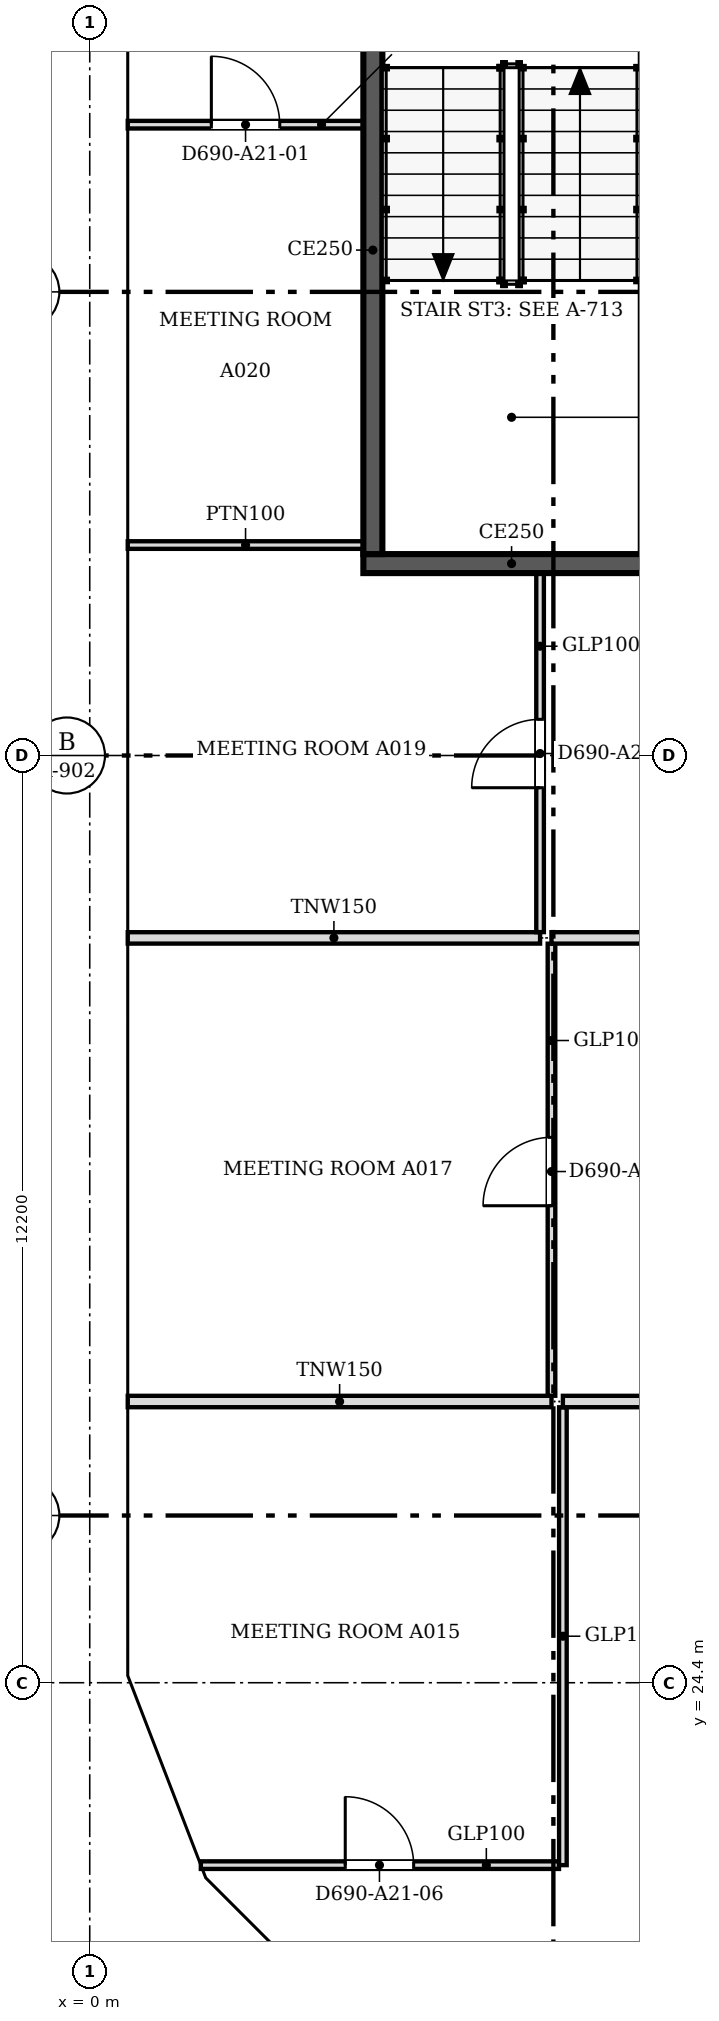
"""IFC4 building model, lengths in metres.
Left out: names, types, materials, properties, quantities, classifications, styles, units other than length and angle.
Written with IfcOpenShell. Run it as: python <this file> out.ifc"""

import sys

from ifc_helpers import new_model, si_unit, direction, frame, frame_2d, origin, place, context, subcontext, project, spatial, polyline, rectangle, outline, extrude, faceted_brep, source, transform, mapped, element, fill, save


model = new_model("IFC4")
c1 = context("Model", 3, precision=1e-05, world=origin(), true_north=direction((0.0, 1.0)))
c2 = subcontext(c1, "Body", "Model", "MODEL_VIEW")
j1 = project(units=[si_unit("LENGTHUNIT", "METRE"), si_unit("PLANEANGLEUNIT", "RADIAN")], contexts=[c1])
p1 = place(None, origin())
s1 = spatial("IfcSite", under=j1, at=p1, CompositionType="ELEMENT")
p2 = place(p1, origin())
s2 = spatial("IfcBuilding", under=s1, at=p2, CompositionType="ELEMENT")
p3 = place(p2, frame((0.0, 0.0, 240.7)))
s3 = spatial("IfcBuildingStorey", under=s2, at=p3, CompositionType="ELEMENT", Elevation=240.7)
m1 = source(origin(), c2, "Body", "Brep", [
    faceted_brep([(0.047, -0.25, 0.0), (3.05, -0.25, 3.8), (0.047, -0.25, 7.6), (0.0, -0.25, 7.54), (0.0, -0.25, 0.06), (0.093, 0.25, 7.541), (3.05, 0.25, 3.8), (0.093, 0.25, 0.059), (0.047, 0.0, 0.0), (0.047, 0.0, 7.6)], [[[0, 1, 2, 3, 4]], [[5, 6, 7]], [[7, 6, 1, 0, 8]], [[6, 5, 9, 2, 1]], [[3, 2, 9]], [[8, 0, 4]], [[7, 8, 4, 3, 9, 5]]]),
])
p4 = place(p3, frame((0.25, 48.8, -3.8), z_axis=(0.0, 0.0, 1.0), x_axis=(0.0, -1.0, 0.0)))
e1 = element("IfcWall", 1, at=p4, inside=s3, PredefinedType="SOLIDWALL", context=c2, shape_type="MappedRepresentation", body=[
    mapped(m1, transform((0.0, 0.0, 0.0), scale=1.0)),
])
m2 = source(origin(), c2, "Body", "SweptSolid", [
    extrude(outline(polyline([(0.247, 0.656), (2.731, 3.8), (0.247, 6.944), (0.247, 0.656)])), frame((0.0, 0.26, 0.0), z_axis=(0.0, -1.0, 0.0), x_axis=(1.0, 0.0, 0.0)), (0.0, 0.0, 1.0), 0.52),
])
p5 = place(p4, origin())
e2 = element("IfcOpeningElement", 2, at=p5, cuts=e1, PredefinedType="OPENING", context=c2, shape_type="MappedRepresentation", body=[
    mapped(m2, transform((0.0, 0.0, 0.0), scale=1.0)),
])
m3 = source(origin(), c2, "Body", "SweptSolid", [
    extrude(outline(polyline([(3.05, 0.0), (6.1, 3.8), (3.05, 7.6), (0.0, 3.8), (3.05, 0.0)])), frame((0.0, 0.25, 0.0), z_axis=(0.0, -1.0, 0.0), x_axis=(1.0, 0.0, 0.0)), (0.0, 0.0, 1.0), 0.5),
])
p6 = place(p3, frame((0.25, 45.75, -3.8), z_axis=(0.0, 0.0, 1.0), x_axis=(0.0, -1.0, 0.0)))
e3 = element("IfcWall", 3, at=p6, inside=s3, PredefinedType="SOLIDWALL", context=c2, shape_type="MappedRepresentation", body=[
    mapped(m3, transform((0.0, 0.0, 0.0), scale=1.0)),
])
m4 = source(origin(), c2, "Body", "SweptSolid", [
    extrude(outline(polyline([(3.05, 0.399), (5.78, 3.8), (3.05, 7.201), (0.321, 3.8), (3.05, 0.399)])), frame((0.0, 0.26, 0.0), z_axis=(0.0, -1.0, 0.0), x_axis=(1.0, 0.0, 0.0)), (0.0, 0.0, 1.0), 0.52),
])
p7 = place(p6, origin())
e4 = element("IfcOpeningElement", 4, at=p7, cuts=e3, PredefinedType="OPENING", context=c2, shape_type="MappedRepresentation", body=[
    mapped(m4, transform((0.0, 0.0, 0.0), scale=1.0)),
])
m5 = source(origin(), c2, "Body", "Brep", [
    faceted_brep([(3.05, -0.25, 0.0), (6.1, -0.25, 3.8), (6.1, -0.25, 3.8), (3.05, -0.25, 7.6), (0.0, -0.25, 3.8), (0.0, 0.25, 3.8), (3.05, 0.25, 7.6), (6.1, 0.25, 3.8), (6.1, 0.25, 3.8), (3.05, 0.25, 0.0)], [[[0, 1, 2, 3, 4]], [[5, 6, 7, 8, 9]], [[9, 8, 1, 0]], [[7, 6, 3, 2]], [[6, 5, 4, 3]], [[5, 9, 0, 4]], [[1, 8, 7, 2]]]),
])
p8 = place(p3, frame((0.25, 39.65, -3.8), z_axis=(0.0, 0.0, 1.0), x_axis=(0.0, -1.0, 0.0)))
e5 = element("IfcWall", 5, at=p8, inside=s3, PredefinedType="SOLIDWALL", context=c2, shape_type="MappedRepresentation", body=[
    mapped(m5, transform((0.0, 0.0, 0.0), scale=1.0)),
])
p9 = place(p8, origin())
e6 = element("IfcOpeningElement", 6, at=p9, cuts=e5, PredefinedType="OPENING", context=c2, shape_type="MappedRepresentation", body=[
    mapped(m4, transform((0.0, 0.0, 0.0), scale=1.0)),
])
p10 = place(p3, frame((0.25, 33.55, -3.8), z_axis=(0.0, 0.0, 1.0), x_axis=(0.0, -1.0, 0.0)))
e7 = element("IfcWall", 7, at=p10, inside=s3, PredefinedType="SOLIDWALL", context=c2, shape_type="MappedRepresentation", body=[
    mapped(m3, transform((0.0, 0.0, 0.0), scale=1.0)),
])
p11 = place(p10, origin())
e8 = element("IfcOpeningElement", 8, at=p11, cuts=e7, PredefinedType="OPENING", context=c2, shape_type="MappedRepresentation", body=[
    mapped(m4, transform((0.0, 0.0, 0.0), scale=1.0)),
])
m6 = source(origin(), c2, "Body", "Brep", [
    faceted_brep([(3.003, -0.25, 0.0), (3.05, -0.25, 0.06), (3.05, -0.25, 7.54), (3.003, -0.25, 7.6), (0.0, -0.25, 3.8), (0.0, 0.25, 3.8), (2.957, 0.25, 7.541), (2.957, 0.25, 0.059), (3.003, 0.0, 0.0), (3.003, 0.0, 7.6)], [[[0, 1, 2, 3, 4]], [[5, 6, 7]], [[1, 0, 8]], [[9, 3, 2]], [[6, 5, 4, 3, 9]], [[5, 7, 8, 0, 4]], [[1, 8, 7, 6, 9, 2]]]),
])
p12 = place(p3, frame((0.25, 27.45, -3.8), z_axis=(0.0, 0.0, 1.0), x_axis=(0.0, -1.0, 0.0)))
e9 = element("IfcWall", 9, at=p12, inside=s3, PredefinedType="SOLIDWALL", context=c2, shape_type="MappedRepresentation", body=[
    mapped(m6, transform((0.0, 0.0, 0.0), scale=1.0)),
])
m7 = source(origin(), c2, "Body", "SweptSolid", [
    extrude(outline(polyline([(2.803, 6.944), (0.319, 3.8), (2.803, 0.656), (2.803, 6.944)])), frame((0.0, 0.26, 0.0), z_axis=(0.0, -1.0, 0.0), x_axis=(1.0, 0.0, 0.0)), (0.0, 0.0, 1.0), 0.52),
])
p13 = place(p12, origin())
e10 = element("IfcOpeningElement", 10, at=p13, cuts=e9, PredefinedType="OPENING", context=c2, shape_type="MappedRepresentation", body=[
    mapped(m7, transform((0.0, 0.0, 0.0), scale=1.0)),
])
m8 = source(origin(), c2, "Body", "Brep", [
    faceted_brep([(0.047, -0.25, 0.0), (2.997, -0.25, 3.8), (0.047, -0.25, 7.6), (0.0, -0.25, 7.541), (0.0, -0.25, 0.059), (0.093, 0.25, 7.54), (2.944, 0.25, 3.868), (2.944, 0.25, 3.732), (0.093, 0.25, 0.06), (2.997, 0.0, 3.8), (0.047, 0.0, 0.0), (0.047, 0.0, 7.6)], [[[0, 1, 2, 3, 4]], [[5, 6, 7, 8]], [[8, 7, 9, 1, 0, 10]], [[6, 5, 11, 2, 1, 9]], [[3, 2, 11]], [[10, 0, 4]], [[8, 10, 4, 3, 11, 5]], [[9, 7, 6]]]),
])
p14 = place(p3, frame((0.233, 24.49, -3.8), z_axis=(0.0, 0.0, 1.0), x_axis=(0.359901446078, -0.932990326376, 0.0)))
e11 = element("IfcWall", 11, at=p14, inside=s3, PredefinedType="SOLIDWALL", context=c2, shape_type="MappedRepresentation", body=[
    mapped(m8, transform((0.0, 0.0, 0.0), scale=1.0)),
])
m9 = source(origin(), c2, "Body", "SweptSolid", [
    extrude(outline(polyline([(0.247, 0.665), (2.681, 3.8), (0.247, 6.935), (0.247, 0.665)])), frame((0.0, 0.26, 0.0), z_axis=(0.0, -1.0, 0.0), x_axis=(1.0, 0.0, 0.0)), (0.0, 0.0, 1.0), 0.52),
])
p15 = place(p14, origin())
e12 = element("IfcOpeningElement", 12, at=p15, cuts=e11, PredefinedType="OPENING", context=c2, shape_type="MappedRepresentation", body=[
    mapped(m9, transform((0.0, 0.0, 0.0), scale=1.0)),
])
m10 = source(origin(), c2, "Body", "Brep", [
    faceted_brep([(2.944, -0.25, 0.0), (2.997, -0.25, 0.068), (2.997, -0.25, 7.532), (2.944, -0.25, 7.6), (0.0, -0.25, 3.8), (0.053, 0.25, 3.868), (2.891, 0.25, 7.532), (2.891, 0.25, 0.068), (0.053, 0.25, 3.732), (2.944, 0.0, 0.0), (2.944, 0.0, 7.6), (0.0, 0.0, 3.8)], [[[0, 1, 2, 3, 4]], [[5, 6, 7, 8]], [[1, 0, 9]], [[10, 3, 2]], [[6, 5, 11, 4, 3, 10]], [[8, 7, 9, 0, 4, 11]], [[8, 11, 5]], [[1, 9, 7, 6, 10, 2]]]),
])
p16 = place(p3, frame((1.312, 21.694, -3.8), z_axis=(0.0, 0.0, 1.0), x_axis=(0.707066050402, -0.707147509625, 0.0)))
e13 = element("IfcWall", 13, at=p16, inside=s3, PredefinedType="SOLIDWALL", context=c2, shape_type="MappedRepresentation", body=[
    mapped(m10, transform((0.0, 0.0, 0.0), scale=1.0)),
])
m11 = source(origin(), c2, "Body", "SweptSolid", [
    extrude(outline(polyline([(2.744, 6.934), (0.316, 3.8), (2.744, 0.667), (2.744, 6.934)])), frame((0.0, 0.26, 0.0), z_axis=(0.0, -1.0, 0.0), x_axis=(1.0, 0.0, 0.0)), (0.0, 0.0, 1.0), 0.52),
])
p17 = place(p16, origin())
e14 = element("IfcOpeningElement", 14, at=p17, cuts=e13, PredefinedType="OPENING", context=c2, shape_type="MappedRepresentation", body=[
    mapped(m11, transform((0.0, 0.0, 0.0), scale=1.0)),
])
p18 = place(p2, frame((0.0, 0.0, 244.5)))
s4 = spatial("IfcBuildingStorey", under=s2, at=p18, CompositionType="ELEMENT", Elevation=244.5)
m12 = source(origin(), c2, "Body", "Brep", [
    faceted_brep([(3.003, -0.25, 0.0), (6.053, -0.25, 3.8), (3.003, -0.25, 7.6), (0.0, -0.25, 3.8), (0.047, 0.25, 3.859), (3.003, 0.25, 7.6), (6.053, 0.25, 3.8), (3.003, 0.25, 0.0), (0.047, 0.25, 3.741), (0.0, 0.0, 3.8)], [[[0, 1, 2, 3]], [[4, 5, 6, 7, 8]], [[7, 6, 1, 0]], [[6, 5, 2, 1]], [[5, 4, 9, 3, 2]], [[8, 7, 0, 3, 9]], [[8, 9, 4]]]),
])
p19 = place(p18, frame((0.25, 48.753, -3.8), z_axis=(0.0, 0.0, 1.0), x_axis=(0.0, -1.0, 0.0)))
e15 = element("IfcWall", 15, at=p19, inside=s4, PredefinedType="SOLIDWALL", context=c2, shape_type="MappedRepresentation", body=[
    mapped(m12, transform((0.0, 0.0, 0.0), scale=1.0)),
])
m13 = source(origin(), c2, "Body", "SweptSolid", [
    extrude(outline(polyline([(3.005, 0.401), (5.733, 3.8), (3.005, 7.199), (0.319, 3.8), (3.005, 0.401)])), frame((0.0, 0.26, 0.0), z_axis=(0.0, -1.0, 0.0), x_axis=(1.0, 0.0, 0.0)), (0.0, 0.0, 1.0), 0.52),
])
p20 = place(p19, origin())
e16 = element("IfcOpeningElement", 16, at=p20, cuts=e15, PredefinedType="OPENING", context=c2, shape_type="MappedRepresentation", body=[
    mapped(m13, transform((0.0, 0.0, 0.0), scale=1.0)),
])
p21 = place(p18, frame((0.25, 42.7, -3.8), z_axis=(0.0, 0.0, 1.0), x_axis=(0.0, -1.0, 0.0)))
e17 = element("IfcWall", 17, at=p21, inside=s4, PredefinedType="SOLIDWALL", context=c2, shape_type="MappedRepresentation", body=[
    mapped(m5, transform((0.0, 0.0, 0.0), scale=1.0)),
])
p22 = place(p21, origin())
e18 = element("IfcOpeningElement", 18, at=p22, cuts=e17, PredefinedType="OPENING", context=c2, shape_type="MappedRepresentation", body=[
    mapped(m4, transform((0.0, 0.0, 0.0), scale=1.0)),
])
p23 = place(p18, frame((0.25, 36.6, -3.8), z_axis=(0.0, 0.0, 1.0), x_axis=(0.0, -1.0, 0.0)))
e19 = element("IfcWall", 19, at=p23, inside=s4, PredefinedType="SOLIDWALL", context=c2, shape_type="MappedRepresentation", body=[
    mapped(m3, transform((0.0, 0.0, 0.0), scale=1.0)),
])
p24 = place(p23, origin())
e20 = element("IfcOpeningElement", 20, at=p24, cuts=e19, PredefinedType="OPENING", context=c2, shape_type="MappedRepresentation", body=[
    mapped(m4, transform((0.0, 0.0, 0.0), scale=1.0)),
])
m14 = source(origin(), c2, "Body", "Brep", [
    faceted_brep([(3.05, -0.25, 0.0), (6.053, -0.25, 3.8), (3.05, -0.25, 7.6), (0.0, -0.25, 3.8), (0.0, 0.25, 3.8), (3.05, 0.25, 7.6), (6.007, 0.25, 3.859), (6.007, 0.25, 3.741), (3.05, 0.25, 0.0), (6.053, 0.0, 3.8)], [[[0, 1, 2, 3]], [[4, 5, 6, 7, 8]], [[8, 7, 9, 1, 0]], [[6, 5, 2, 1, 9]], [[5, 4, 3, 2]], [[4, 8, 0, 3]], [[9, 7, 6]]]),
])
p25 = place(p18, frame((0.25, 30.5, -3.8), z_axis=(0.0, 0.0, 1.0), x_axis=(0.0, -1.0, 0.0)))
e21 = element("IfcWall", 21, at=p25, inside=s4, PredefinedType="SOLIDWALL", context=c2, shape_type="MappedRepresentation", body=[
    mapped(m14, transform((0.0, 0.0, 0.0), scale=1.0)),
])
m15 = source(origin(), c2, "Body", "SweptSolid", [
    extrude(outline(polyline([(3.049, 0.401), (5.735, 3.8), (3.049, 7.199), (0.321, 3.8), (3.049, 0.401)])), frame((0.0, 0.26, 0.0), z_axis=(0.0, -1.0, 0.0), x_axis=(1.0, 0.0, 0.0)), (0.0, 0.0, 1.0), 0.52),
])
p26 = place(p25, origin())
e22 = element("IfcOpeningElement", 22, at=p26, cuts=e21, PredefinedType="OPENING", context=c2, shape_type="MappedRepresentation", body=[
    mapped(m15, transform((0.0, 0.0, 0.0), scale=1.0)),
])
m16 = source(origin(), c2, "Body", "Brep", [
    faceted_brep([(2.95, -0.25, 0.0), (3.003, -0.25, 0.068), (3.003, -0.25, 7.532), (2.95, -0.25, 7.6), (0.0, -0.25, 3.8), (0.047, 0.25, 3.86), (2.898, 0.25, 7.532), (2.898, 0.25, 0.068), (0.047, 0.25, 3.74), (2.95, 0.0, 0.0), (2.95, 0.0, 7.6), (0.0, 0.0, 3.8)], [[[0, 1, 2, 3, 4]], [[5, 6, 7, 8]], [[1, 0, 9]], [[10, 3, 2]], [[6, 5, 11, 4, 3, 10]], [[8, 7, 9, 0, 4, 11]], [[8, 11, 5]], [[1, 9, 7, 6, 10, 2]]]),
])
p27 = place(p18, frame((0.25, 24.447, -3.8), z_axis=(0.0, 0.0, 1.0), x_axis=(0.35992665181, -0.932980602862, 0.0)))
e23 = element("IfcWall", 23, at=p27, inside=s4, PredefinedType="SOLIDWALL", context=c2, shape_type="MappedRepresentation", body=[
    mapped(m16, transform((0.0, 0.0, 0.0), scale=1.0)),
])
m17 = source(origin(), c2, "Body", "SweptSolid", [
    extrude(outline(polyline([(2.75, 6.935), (0.316, 3.8), (2.75, 0.665), (2.75, 6.935)])), frame((0.0, 0.26, 0.0), z_axis=(0.0, -1.0, 0.0), x_axis=(1.0, 0.0, 0.0)), (0.0, 0.0, 1.0), 0.52),
])
p28 = place(p27, origin())
e24 = element("IfcOpeningElement", 24, at=p28, cuts=e23, PredefinedType="OPENING", context=c2, shape_type="MappedRepresentation", body=[
    mapped(m17, transform((0.0, 0.0, 0.0), scale=1.0)),
])
m18 = source(origin(), c2, "Body", "Brep", [
    faceted_brep([(0.053, -0.25, 0.0), (2.997, -0.25, 3.8), (0.053, -0.25, 7.6), (0.0, -0.25, 7.532), (0.0, -0.25, 0.068), (0.106, 0.25, 7.532), (2.944, 0.25, 3.868), (2.944, 0.25, 3.732), (0.106, 0.25, 0.068), (2.997, 0.0, 3.8), (0.053, 0.0, 0.0), (0.053, 0.0, 7.6)], [[[0, 1, 2, 3, 4]], [[5, 6, 7, 8]], [[8, 7, 9, 1, 0, 10]], [[6, 5, 11, 2, 1, 9]], [[3, 2, 11]], [[10, 0, 4]], [[8, 10, 4, 3, 11, 5]], [[9, 7, 6]]]),
])
p29 = place(p18, frame((1.274, 21.731, -3.8), z_axis=(0.0, 0.0, 1.0), x_axis=(0.707147509625, -0.707066050402, 0.0)))
e25 = element("IfcWall", 25, at=p29, inside=s4, PredefinedType="SOLIDWALL", context=c2, shape_type="MappedRepresentation", body=[
    mapped(m18, transform((0.0, 0.0, 0.0), scale=1.0)),
])
m19 = source(origin(), c2, "Body", "SweptSolid", [
    extrude(outline(polyline([(0.253, 0.666), (2.681, 3.8), (0.253, 6.934), (0.253, 0.666)])), frame((0.0, 0.26, 0.0), z_axis=(0.0, -1.0, 0.0), x_axis=(1.0, 0.0, 0.0)), (0.0, 0.0, 1.0), 0.52),
])
p30 = place(p29, origin())
e26 = element("IfcOpeningElement", 26, at=p30, cuts=e25, PredefinedType="OPENING", context=c2, shape_type="MappedRepresentation", body=[
    mapped(m19, transform((0.0, 0.0, 0.0), scale=1.0)),
])
p31 = place(p3, frame((7.5, 39.125, 0.0), z_axis=(0.0, 0.0, 1.0), x_axis=(-1.0, 0.0, 0.0)))
e27 = element("IfcWall", 27, at=p31, inside=s3, PredefinedType="SOLIDWALL", context=c2, shape_type="SweptSolid", body=[
    extrude(rectangle(XDim=3.9, YDim=0.25, at=frame_2d((1.95, 0.0))), origin(), (0.0, 0.0, 1.0), 3.8),
])
p32 = place(p3, frame((3.725, 39.25, 0.0), z_axis=(0.0, 0.0, 1.0), x_axis=(0.0, 1.0, 0.0)))
e28 = element("IfcWall", 28, at=p32, inside=s3, PredefinedType="SOLIDWALL", context=c2, shape_type="SweptSolid", body=[
    extrude(rectangle(XDim=8.0, YDim=0.25, at=frame_2d((4.0, 0.0))), origin(), (0.0, 0.0, 1.0), 3.8),
])
p33 = place(p3, frame((1.462, 22.0, 0.0), z_axis=(0.0, 0.0, 1.0), x_axis=(1.0, 0.0, 0.0)))
e29 = element("IfcWall", 29, at=p33, inside=s3, PredefinedType="PARTITIONING", context=c2, shape_type="SweptSolid", body=[
    extrude(rectangle(XDim=4.712, YDim=0.1, at=frame_2d((2.356, 0.0))), origin(), (0.0, 0.0, 1.0), 3.067),
])
m20 = source(origin(), c2, "Body", "SweptSolid", [
    extrude(rectangle(XDim=0.9, YDim=2.1, at=frame_2d((0.45, 1.05))), frame((0.0, 0.06, 0.0), z_axis=(0.0, -1.0, 0.0), x_axis=(1.0, 0.0, 0.0)), (0.0, 0.0, 1.0), 0.12),
])
p34 = place(p33, frame((1.9, 0.0, 0.0)))
e30 = element("IfcOpeningElement", 30, at=p34, cuts=e29, PredefinedType="OPENING", context=c2, shape_type="MappedRepresentation", body=[
    mapped(m20, transform((0.0, 0.0, 0.0), scale=1.0)),
])
p35 = place(p3, frame((6.225, 22.0, 0.0), z_axis=(0.0, 0.0, 1.0), x_axis=(0.0, 1.0, 0.0)))
e31 = element("IfcWall", 31, at=p35, inside=s3, PredefinedType="PARTITIONING", context=c2, shape_type="SweptSolid", body=[
    extrude(rectangle(XDim=6.024, YDim=0.1, at=frame_2d((3.012, 0.0))), origin(), (0.0, 0.0, 1.0), 3.067),
])
p36 = place(p3, frame((0.5, 28.1, 0.0), z_axis=(0.0, 0.0, 1.0), x_axis=(1.0, 0.0, 0.0)))
e32 = element("IfcWall", 32, at=p36, inside=s3, PredefinedType="PARTITIONING", context=c2, shape_type="SweptSolid", body=[
    extrude(rectangle(XDim=5.575, YDim=0.15, at=frame_2d((2.788, 0.0))), origin(), (0.0, 0.0, 1.0), 3.067),
])
p37 = place(p3, frame((6.225, 28.1, 0.0), z_axis=(0.0, 0.0, 1.0), x_axis=(1.0, 0.0, 0.0)))
e33 = element("IfcWall", 33, at=p37, inside=s3, PredefinedType="PARTITIONING", context=c2, shape_type="SweptSolid", body=[
    extrude(rectangle(XDim=21.799, YDim=0.15, at=frame_2d((10.899, 0.0))), origin(), (0.0, 0.0, 1.0), 3.067),
])
p38 = place(p3, frame((6.075, 28.176, 0.0), z_axis=(0.0, 0.0, 1.0), x_axis=(0.0, 1.0, 0.0)))
e34 = element("IfcWall", 34, at=p38, inside=s3, PredefinedType="PARTITIONING", context=c2, shape_type="SweptSolid", body=[
    extrude(rectangle(XDim=5.948, YDim=0.1, at=frame_2d((2.974, 0.0))), origin(), (0.0, 0.0, 1.0), 3.067),
])
p39 = place(p38, frame((2.5, 0.0, 0.0)))
e35 = element("IfcOpeningElement", 35, at=p39, cuts=e34, PredefinedType="OPENING", context=c2, shape_type="MappedRepresentation", body=[
    mapped(m20, transform((0.0, 0.0, 0.0), scale=1.0)),
])
p40 = place(p3, frame((0.5, 34.2, 0.0), z_axis=(0.0, 0.0, 1.0), x_axis=(1.0, 0.0, 0.0)))
e36 = element("IfcWall", 36, at=p40, inside=s3, PredefinedType="PARTITIONING", context=c2, shape_type="SweptSolid", body=[
    extrude(rectangle(XDim=5.425, YDim=0.15, at=frame_2d((2.712, 0.0))), origin(), (0.0, 0.0, 1.0), 3.067),
])
p41 = place(p3, frame((6.075, 34.2, 0.0), z_axis=(0.0, 0.0, 1.0), x_axis=(1.0, 0.0, 0.0)))
e37 = element("IfcWall", 37, at=p41, inside=s3, PredefinedType="PARTITIONING", context=c2, shape_type="SweptSolid", body=[
    extrude(rectangle(XDim=21.949, YDim=0.15, at=frame_2d((10.975, 0.0))), origin(), (0.0, 0.0, 1.0), 3.067),
])
p42 = place(p3, frame((5.925, 34.276, 0.0), z_axis=(0.0, 0.0, 1.0), x_axis=(0.0, 1.0, 0.0)))
e38 = element("IfcWall", 38, at=p42, inside=s3, PredefinedType="PARTITIONING", context=c2, shape_type="SweptSolid", body=[
    extrude(rectangle(XDim=4.724, YDim=0.1, at=frame_2d((2.362, 0.0))), origin(), (0.0, 0.0, 1.0), 3.067),
])
p43 = place(p42, frame((1.9, 0.0, 0.0)))
e39 = element("IfcOpeningElement", 39, at=p43, cuts=e38, PredefinedType="OPENING", context=c2, shape_type="MappedRepresentation", body=[
    mapped(m20, transform((0.0, 0.0, 0.0), scale=1.0)),
])
p44 = place(p3, frame((0.5, 39.369, 0.0), z_axis=(0.0, 0.0, 1.0), x_axis=(1.0, 0.0, 0.0)))
e40 = element("IfcWall", 40, at=p44, inside=s3, PredefinedType="PARTITIONING", context=c2, shape_type="SweptSolid", body=[
    extrude(rectangle(XDim=3.1, YDim=0.1, at=frame_2d((1.55, 0.0))), origin(), (0.0, 0.0, 1.0), 3.067),
])
p45 = place(p3, frame((3.6, 44.9, 0.0), z_axis=(0.0, 0.0, 1.0), x_axis=(-1.0, 0.0, 0.0)))
e41 = element("IfcWall", 41, at=p45, inside=s3, PredefinedType="PARTITIONING", context=c2, shape_type="SweptSolid", body=[
    extrude(rectangle(XDim=3.1, YDim=0.1, at=frame_2d((1.55, 0.0))), origin(), (0.0, 0.0, 1.0), 3.067),
])
p46 = place(p45, frame((1.1, 0.0, 0.0)))
e42 = element("IfcOpeningElement", 42, at=p46, cuts=e41, PredefinedType="OPENING", context=c2, shape_type="MappedRepresentation", body=[
    mapped(m20, transform((0.0, 0.0, 0.0), scale=1.0)),
])
m21 = source(origin(), c2, "Body", "SweptSolid", [
    extrude(rectangle(XDim=0.9, YDim=2.1, at=frame_2d((0.45, 1.05))), frame((0.0, 0.025, 0.0), z_axis=(0.0, -1.0, 0.0), x_axis=(1.0, 0.0, 0.0)), (0.0, 0.0, 1.0), 0.05),
])
p47 = place(p46, origin())
e43 = element("IfcDoor", 43, at=p47, inside=s3, OperationType="SINGLE_SWING_RIGHT", PredefinedType="DOOR", context=c2, shape_type="MappedRepresentation", body=[
    mapped(m21, transform((0.0, 0.0, 0.0), scale=1.0)),
])
fill(e42, e43)
p48 = place(p43, origin())
e44 = element("IfcDoor", 44, at=p48, inside=s3, OperationType="SINGLE_SWING_LEFT", PredefinedType="DOOR", context=c2, shape_type="MappedRepresentation", body=[
    mapped(m21, transform((0.0, 0.0, 0.0), scale=1.0)),
])
fill(e39, e44)
p49 = place(p39, origin())
e45 = element("IfcDoor", 45, at=p49, inside=s3, OperationType="SINGLE_SWING_LEFT", PredefinedType="DOOR", context=c2, shape_type="MappedRepresentation", body=[
    mapped(m21, transform((0.0, 0.0, 0.0), scale=1.0)),
])
fill(e35, e45)
p50 = place(p34, origin())
e46 = element("IfcDoor", 46, at=p50, inside=s3, OperationType="SINGLE_SWING_LEFT", PredefinedType="DOOR", context=c2, shape_type="MappedRepresentation", body=[
    mapped(m21, transform((0.0, 0.0, 0.0), scale=1.0)),
])
fill(e30, e46)
save(model, sys.argv[1])
